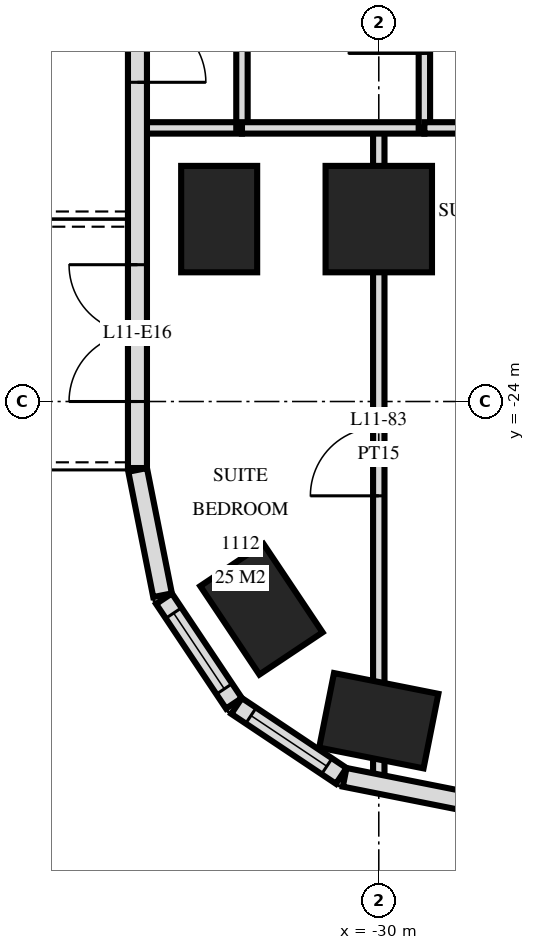
"""IFC4 building model, lengths in metres.
Left out: names, types, materials, properties, quantities, classifications, styles, units other than length and angle.
Written with IfcOpenShell. Run it as: python <this file> out.ifc"""

import sys

from ifc_helpers import new_model, si_unit, direction, frame, frame_2d, origin, origin_2d, place, context, subcontext, project, spatial, rectangle, extrude, element, fill, save


model = new_model("IFC4")
c1 = context("Model", 3, precision=1e-05, world=origin(), true_north=direction((0.0, 1.0)))
c2 = subcontext(c1, "Body", "Model", "MODEL_VIEW")
j1 = project(units=[si_unit("LENGTHUNIT", "METRE"), si_unit("PLANEANGLEUNIT", "RADIAN")], contexts=[c1])
p1 = place(None, origin())
s1 = spatial("IfcSite", under=j1, at=p1, CompositionType="ELEMENT")
p2 = place(p1, origin())
s2 = spatial("IfcBuilding", under=s1, at=p2, CompositionType="ELEMENT")
p3 = place(p2, frame((0.0, 0.0, 49.2)))
s3 = spatial("IfcBuildingStorey", under=s2, at=p3, CompositionType="ELEMENT", Elevation=49.2)
for number, where, z_axis, x_axis in (
    (1, (-32.1, -21.6, 0.0), (0.0, 0.0, 1.0), (0.0, 1.0, 0.0)),
    (2, (-31.544, -26.733, 0.0), (0.0, 0.0, 1.0), (-0.556, 0.831, 0.0)),
    (3, (-30.0, -28.2, 0.0), (0.0, 0.0, 1.0), (-0.981, 0.195, 0.0)),
):
    element("IfcColumn", number, at=place(p3, frame(where, z_axis=z_axis, x_axis=x_axis)), inside=s3, PredefinedType="COLUMN", context=c2, shape_type="SweptSolid", body=[
        extrude(rectangle(XDim=1.4, YDim=1.0, at=origin_2d()), origin(), (0.0, 0.0, 1.0), 3.6),
    ])
p4 = place(p3, frame((-30.0, -21.6, 0.0), z_axis=(0.0, 0.0, 1.0), x_axis=(1.0, 0.0, 0.0)))
e4 = element("IfcColumn", 4, at=p4, inside=s3, PredefinedType="COLUMN", context=c2, shape_type="SweptSolid", body=[
    extrude(rectangle(XDim=1.4, YDim=1.4, at=origin_2d()), origin(), (0.0, 0.0, 1.0), 3.6),
])
p5 = place(p3, frame((-33.175, -3.325, 0.0), z_axis=(0.0, 0.0, 1.0), x_axis=(0.0, -1.0, 0.0)))
e5 = element("IfcWall", 5, at=p5, inside=s3, PredefinedType="SOLIDWALL", context=c2, shape_type="SweptSolid", body=[
    extrude(rectangle(XDim=21.551, YDim=0.25, at=frame_2d((10.775, 0.0))), origin(), (0.0, 0.0, 1.0), 3.32),
])
p6 = place(p5, frame((6.65, 0.0, 0.0)))
e6 = element("IfcOpeningElement", 6, at=p6, cuts=e5, PredefinedType="OPENING", context=c2, shape_type="SweptSolid", body=[
    extrude(rectangle(XDim=1.8, YDim=2.4, at=frame_2d((0.9, 1.2))), frame((0.0, 0.135, 0.0), z_axis=(0.0, -1.0, 0.0), x_axis=(1.0, 0.0, 0.0)), (0.0, 0.0, 1.0), 0.27),
])
p7 = place(p5, frame((12.275, 0.0, 0.3)))
e7 = element("IfcOpeningElement", 7, at=p7, cuts=e5, PredefinedType="OPENING", context=c2, shape_type="SweptSolid", body=[
    extrude(rectangle(XDim=1.2, YDim=2.1, at=frame_2d((0.6, 1.05))), frame((0.0, 0.135, 0.0), z_axis=(0.0, -1.0, 0.0), x_axis=(1.0, 0.0, 0.0)), (0.0, 0.0, 1.0), 0.27),
])
p8 = place(p5, frame((14.675, 0.0, 0.0)))
e8 = element("IfcOpeningElement", 8, at=p8, cuts=e5, PredefinedType="OPENING", context=c2, shape_type="SweptSolid", body=[
    extrude(rectangle(XDim=1.8, YDim=2.4, at=frame_2d((0.9, 1.2))), frame((0.0, 0.135, 0.0), z_axis=(0.0, -1.0, 0.0), x_axis=(1.0, 0.0, 0.0)), (0.0, 0.0, 1.0), 0.27),
])
p9 = place(p5, frame((18.875, 0.0, 0.0)))
e9 = element("IfcOpeningElement", 9, at=p9, cuts=e5, PredefinedType="OPENING", context=c2, shape_type="SweptSolid", body=[
    extrude(rectangle(XDim=1.8, YDim=2.4, at=frame_2d((0.9, 1.2))), frame((0.0, 0.135, 0.0), z_axis=(0.0, -1.0, 0.0), x_axis=(1.0, 0.0, 0.0)), (0.0, 0.0, 1.0), 0.27),
])
p10 = place(p3, frame((-33.173, -24.9, 0.0), z_axis=(0.0, 0.0, 1.0), x_axis=(0.195166572128, -0.980770110232, 0.0)))
e10 = element("IfcWall", 10, at=p10, inside=s3, PredefinedType="SOLIDWALL", context=c2, shape_type="SweptSolid", body=[
    extrude(rectangle(XDim=1.681, YDim=0.25, at=frame_2d((0.841, 0.0))), origin(), (0.0, 0.0, 1.0), 3.32),
])
p11 = place(p3, frame((-32.826, -26.594, 0.0), z_axis=(0.0, 0.0, 1.0), x_axis=(0.55555029066, -0.831482937015, 0.0)))
e11 = element("IfcWall", 11, at=p11, inside=s3, PredefinedType="SOLIDWALL", context=c2, shape_type="SweptSolid", body=[
    extrude(rectangle(XDim=1.656, YDim=0.25, at=frame_2d((0.828, 0.0))), origin(), (0.0, 0.0, 1.0), 3.32),
])
p12 = place(p11, frame((0.228, 0.0, 0.9)))
e12 = element("IfcOpeningElement", 12, at=p12, cuts=e11, PredefinedType="OPENING", context=c2, shape_type="SweptSolid", body=[
    extrude(rectangle(XDim=1.2, YDim=1.5, at=frame_2d((0.6, 0.75))), frame((0.0, 0.135, 0.0), z_axis=(0.0, -1.0, 0.0), x_axis=(1.0, 0.0, 0.0)), (0.0, 0.0, 1.0), 0.27),
])
p13 = place(p3, frame((-31.871, -28.006, 0.0), z_axis=(0.0, 0.0, 1.0), x_axis=(0.831482937015, -0.55555029066, 0.0)))
e13 = element("IfcWall", 13, at=p13, inside=s3, PredefinedType="SOLIDWALL", context=c2, shape_type="SweptSolid", body=[
    extrude(rectangle(XDim=1.656, YDim=0.25, at=frame_2d((0.828, 0.0))), origin(), (0.0, 0.0, 1.0), 3.32),
])
p14 = place(p13, frame((0.228, 0.0, 0.9)))
e14 = element("IfcOpeningElement", 14, at=p14, cuts=e13, PredefinedType="OPENING", context=c2, shape_type="SweptSolid", body=[
    extrude(rectangle(XDim=1.2, YDim=1.5, at=frame_2d((0.6, 0.75))), frame((0.0, 0.135, 0.0), z_axis=(0.0, -1.0, 0.0), x_axis=(1.0, 0.0, 0.0)), (0.0, 0.0, 1.0), 0.27),
])
p15 = place(p3, frame((-30.449, -28.945, 0.0), z_axis=(0.0, 0.0, 1.0), x_axis=(0.980775640221, -0.19513878023, 0.0)))
e15 = element("IfcWall", 15, at=p15, inside=s3, PredefinedType="SOLIDWALL", context=c2, shape_type="SweptSolid", body=[
    extrude(rectangle(XDim=1.681, YDim=0.25, at=frame_2d((0.841, 0.0))), origin(), (0.0, 0.0, 1.0), 3.32),
])
p16 = place(p3, frame((-29.4, -20.4, 0.0), z_axis=(0.0, 0.0, 1.0), x_axis=(0.0, 1.0, 0.0)))
e16 = element("IfcWall", 16, at=p16, inside=s3, PredefinedType="PARTITIONING", context=c2, shape_type="SweptSolid", body=[
    extrude(rectangle(XDim=3.0, YDim=0.15, at=frame_2d((1.5, 0.0))), origin(), (0.0, 0.0, 1.0), 3.32),
])
p17 = place(p16, frame((0.98, 0.0, 0.0)))
e17 = element("IfcOpeningElement", 17, at=p17, cuts=e16, PredefinedType="OPENING", context=c2, shape_type="SweptSolid", body=[
    extrude(rectangle(XDim=1.0, YDim=2.1, at=frame_2d((0.5, 1.05))), frame((0.0, 0.085, 0.0), z_axis=(0.0, -1.0, 0.0), x_axis=(1.0, 0.0, 0.0)), (0.0, 0.0, 1.0), 0.17),
])
p18 = place(p3, frame((-30.0, -28.978, 0.0), z_axis=(0.0, 0.0, 1.0), x_axis=(0.0, 1.0, 0.0)))
e18 = element("IfcWall", 18, at=p18, inside=s3, PredefinedType="PARTITIONING", context=c2, shape_type="SweptSolid", body=[
    extrude(rectangle(XDim=8.578, YDim=0.15, at=frame_2d((4.289, 0.0))), origin(), (0.0, 0.0, 1.0), 3.32),
])
p19 = place(p18, frame((3.737, 0.0, 0.0)))
e19 = element("IfcOpeningElement", 19, at=p19, cuts=e18, PredefinedType="OPENING", context=c2, shape_type="SweptSolid", body=[
    extrude(rectangle(XDim=0.9, YDim=2.1, at=frame_2d((0.45, 1.05))), frame((0.0, 0.085, 0.0), z_axis=(0.0, -1.0, 0.0), x_axis=(1.0, 0.0, 0.0)), (0.0, 0.0, 1.0), 0.17),
])
p20 = place(p3, frame((-31.8, -20.4, 0.0), z_axis=(0.0, 0.0, 1.0), x_axis=(0.0, 1.0, 0.0)))
e20 = element("IfcWall", 20, at=p20, inside=s3, PredefinedType="PLUMBINGWALL", context=c2, shape_type="SweptSolid", body=[
    extrude(rectangle(XDim=3.0, YDim=0.15, at=frame_2d((1.5, 0.0))), origin(), (0.0, 0.0, 1.0), 3.32),
])
p21 = place(p20, frame((1.08, 0.0, 0.0)))
e21 = element("IfcOpeningElement", 21, at=p21, cuts=e20, PredefinedType="OPENING", context=c2, shape_type="SweptSolid", body=[
    extrude(rectangle(XDim=0.8, YDim=2.1, at=frame_2d((0.4, 1.05))), frame((0.0, 0.085, 0.0), z_axis=(0.0, -1.0, 0.0), x_axis=(1.0, 0.0, 0.0)), (0.0, 0.0, 1.0), 0.17),
])
p22 = place(p3, frame((-29.4, -20.4, 0.0), z_axis=(0.0, 0.0, 1.0), x_axis=(1.0, 0.0, 0.0)))
e22 = element("IfcWall", 22, at=p22, inside=s3, PredefinedType="PARTITIONING", context=c2, shape_type="SweptSolid", body=[
    extrude(rectangle(XDim=2.4, YDim=0.15, at=frame_2d((1.2, 0.0))), origin(), (0.0, 0.0, 1.0), 3.32),
])
p23 = place(p22, frame((0.68, 0.0, 0.0)))
e23 = element("IfcOpeningElement", 23, at=p23, cuts=e22, PredefinedType="OPENING", context=c2, shape_type="SweptSolid", body=[
    extrude(rectangle(XDim=1.0, YDim=2.1, at=frame_2d((0.5, 1.05))), frame((0.0, 0.085, 0.0), z_axis=(0.0, -1.0, 0.0), x_axis=(1.0, 0.0, 0.0)), (0.0, 0.0, 1.0), 0.17),
])
p24 = place(p3, frame((-31.8, -20.4, 0.0), z_axis=(0.0, 0.0, 1.0), x_axis=(1.0, 0.0, 0.0)))
e24 = element("IfcWall", 24, at=p24, inside=s3, PredefinedType="PARTITIONING", context=c2, shape_type="SweptSolid", body=[
    extrude(rectangle(XDim=2.4, YDim=0.15, at=frame_2d((1.2, 0.0))), origin(), (0.0, 0.0, 1.0), 3.32),
])
p25 = place(p3, frame((-33.12, -20.4, 0.0), z_axis=(0.0, 0.0, 1.0), x_axis=(1.0, 0.0, 0.0)))
e25 = element("IfcWall", 25, at=p25, inside=s3, PredefinedType="PLUMBINGWALL", context=c2, shape_type="SweptSolid", body=[
    extrude(rectangle(XDim=1.32, YDim=0.15, at=frame_2d((0.66, 0.0))), origin(), (0.0, 0.0, 1.0), 3.32),
])
p26 = place(p12, origin())
e26 = element("IfcWindow", 26, at=p26, inside=s3, PartitioningType="SINGLE_PANEL", PredefinedType="WINDOW", context=c2, shape_type="SweptSolid", body=[
    extrude(rectangle(XDim=1.2, YDim=1.5, at=frame_2d((0.6, 0.75))), frame((0.0, 0.03, 0.0), z_axis=(0.0, -1.0, 0.0), x_axis=(1.0, 0.0, 0.0)), (0.0, 0.0, 1.0), 0.06),
])
fill(e12, e26)
p27 = place(p14, origin())
e27 = element("IfcWindow", 27, at=p27, inside=s3, PartitioningType="SINGLE_PANEL", PredefinedType="WINDOW", context=c2, shape_type="SweptSolid", body=[
    extrude(rectangle(XDim=1.2, YDim=1.5, at=frame_2d((0.6, 0.75))), frame((0.0, 0.03, 0.0), z_axis=(0.0, -1.0, 0.0), x_axis=(1.0, 0.0, 0.0)), (0.0, 0.0, 1.0), 0.06),
])
fill(e14, e27)
p28 = place(p8, origin())
e28 = element("IfcDoor", 28, at=p28, inside=s3, OperationType="DOUBLE_DOOR_SINGLE_SWING", PredefinedType="DOOR", context=c2, shape_type="SweptSolid", body=[
    extrude(rectangle(XDim=1.8, YDim=2.4, at=frame_2d((0.9, 1.2))), frame((0.0, 0.025, 0.0), z_axis=(0.0, -1.0, 0.0), x_axis=(1.0, 0.0, 0.0)), (0.0, 0.0, 1.0), 0.05),
])
fill(e8, e28)
p29 = place(p9, frame((0.9, 0.0, 0.0), z_axis=(0.0, 0.0, 1.0), x_axis=(-1.0, 0.0, 0.0)))
e29 = element("IfcDoor", 29, at=p29, inside=s3, OperationType="DOUBLE_DOOR_SINGLE_SWING", PredefinedType="DOOR", context=c2, shape_type="SweptSolid", body=[
    extrude(rectangle(XDim=1.8, YDim=2.4, at=frame_2d((0.0, 1.2))), frame((0.0, -0.025, 0.0), z_axis=(0.0, 1.0, 0.0), x_axis=(-1.0, 0.0, 0.0)), (0.0, 0.0, 1.0), 0.05),
])
fill(e9, e29)
p30 = place(p17, origin())
e30 = element("IfcDoor", 30, at=p30, inside=s3, OperationType="SINGLE_SWING_RIGHT", PredefinedType="DOOR", context=c2, shape_type="SweptSolid", body=[
    extrude(rectangle(XDim=1.0, YDim=2.1, at=frame_2d((0.5, 1.05))), frame((0.0, 0.025, 0.0), z_axis=(0.0, -1.0, 0.0), x_axis=(1.0, 0.0, 0.0)), (0.0, 0.0, 1.0), 0.05),
])
fill(e17, e30)
p31 = place(p19, origin())
e31 = element("IfcDoor", 31, at=p31, inside=s3, OperationType="SINGLE_SWING_RIGHT", PredefinedType="DOOR", context=c2, shape_type="SweptSolid", body=[
    extrude(rectangle(XDim=0.9, YDim=2.1, at=frame_2d((0.45, 1.05))), frame((0.0, 0.025, 0.0), z_axis=(0.0, -1.0, 0.0), x_axis=(1.0, 0.0, 0.0)), (0.0, 0.0, 1.0), 0.05),
])
fill(e19, e31)
save(model, sys.argv[1])
